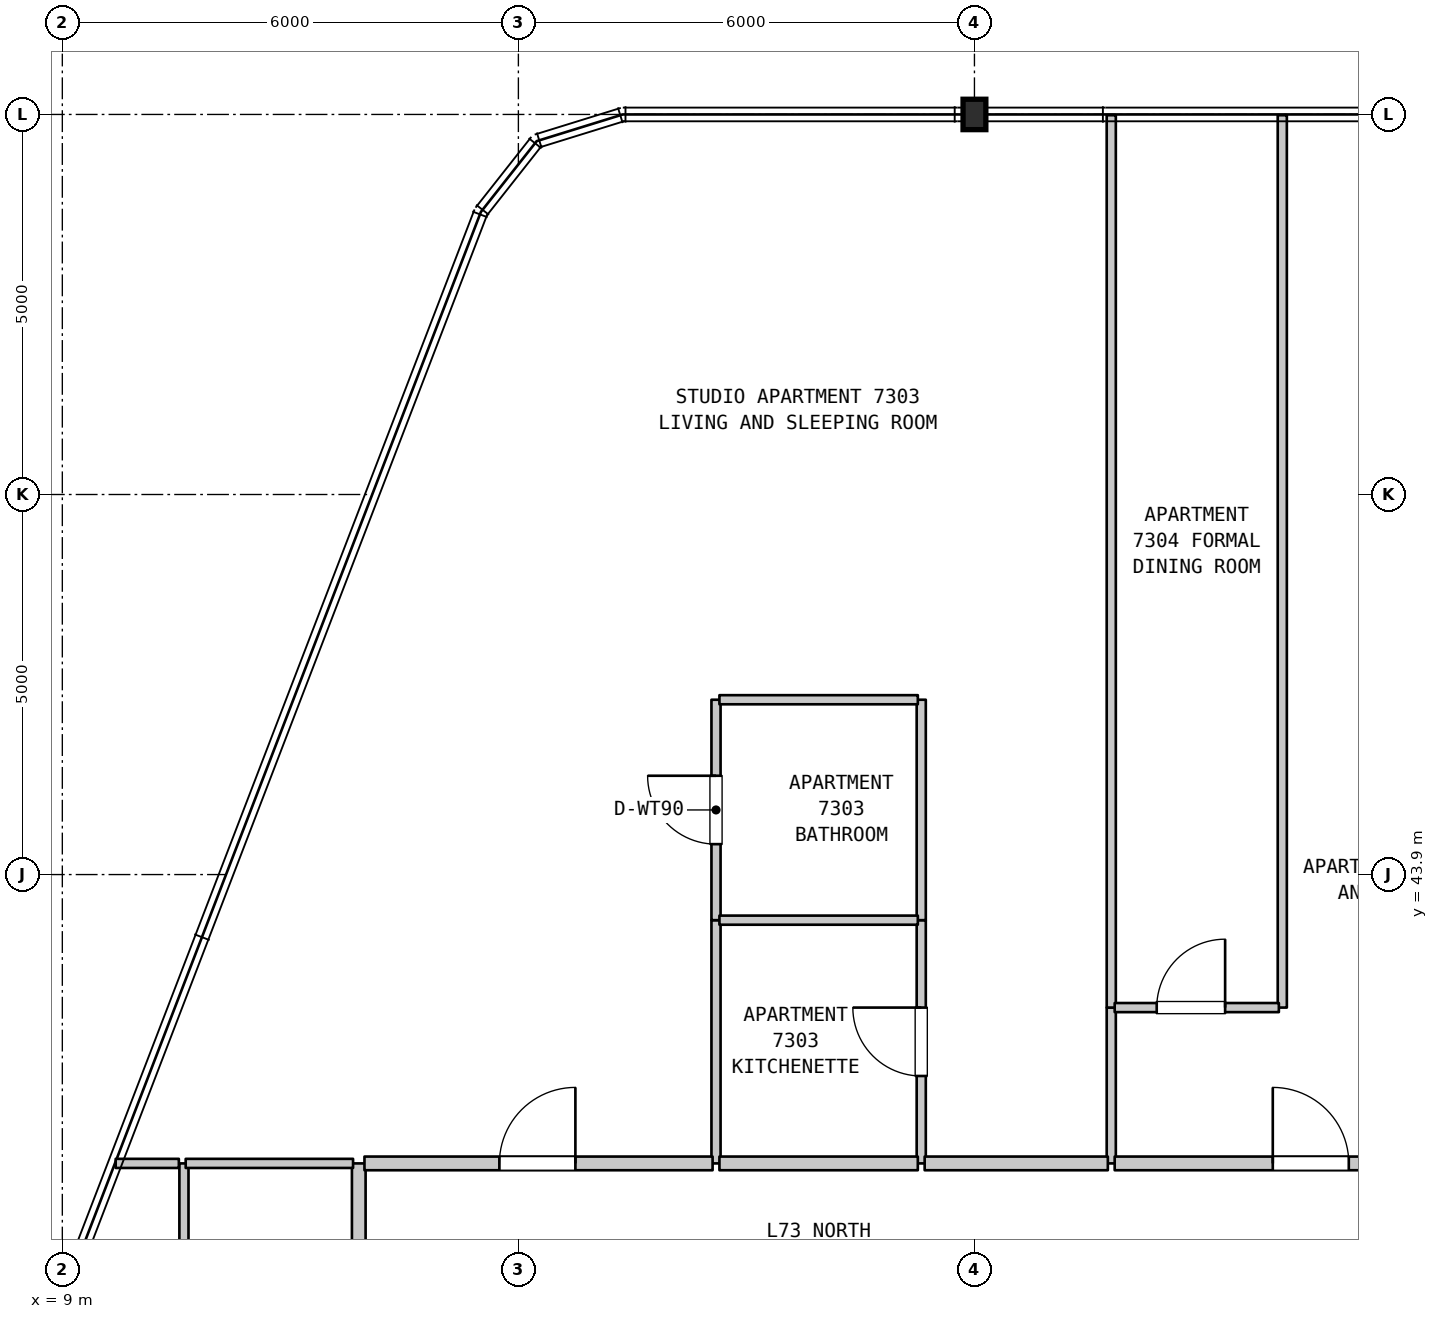
"""IFC4 building model, lengths in metres.
Left out: names, types, materials, properties, quantities, classifications, styles, units other than length and angle.
Written with IfcOpenShell. Run it as: python <this file> out.ifc"""

import sys

from ifc_helpers import new_model, si_unit, direction, frame, frame_2d, origin, origin_2d, place, context, subcontext, project, spatial, rectangle, i_section, extrude, element, fill, save


model = new_model("IFC4")
c1 = context("Model", 3, precision=1e-05, world=origin(), true_north=direction((0.0, 1.0)))
c2 = subcontext(c1, "Body", "Model", "MODEL_VIEW")
j1 = project(units=[si_unit("LENGTHUNIT", "METRE"), si_unit("PLANEANGLEUNIT", "RADIAN")], contexts=[c1])
p1 = place(None, origin())
s1 = spatial("IfcSite", under=j1, at=p1, CompositionType="ELEMENT")
p2 = place(p1, origin())
s2 = spatial("IfcBuilding", under=s1, at=p2, CompositionType="ELEMENT")
p3 = place(p2, frame((0.0, 0.0, 291.7)))
s3 = spatial("IfcBuildingStorey", under=s2, at=p3, CompositionType="ELEMENT", Elevation=291.7)
p4 = place(p3, frame((21.0, 53.9, 0.0), z_axis=(0.0, 0.0, 1.0), x_axis=(1.0, 0.0, 0.0)))
e1 = element("IfcColumn", 1, at=p4, inside=s3, PredefinedType="COLUMN", context=c2, shape_type="SweptSolid", body=[
    extrude(i_section(OverallWidth=0.3, OverallDepth=0.4, WebThickness=0.013, FlangeThickness=0.024, FilletRadius=0.027, at=origin_2d()), origin(), (0.0, 0.0, 1.0), 3.7),
])
p5 = place(p3, frame((10.6, 35.59, 0.0), z_axis=(0.0, 0.0, 1.0), x_axis=(0.0, 1.0, 0.0)))
e2 = element("IfcWall", 2, at=p5, inside=s3, PredefinedType="PARTITIONING", context=c2, shape_type="SweptSolid", body=[
    extrude(rectangle(XDim=4.51, YDim=0.12, at=frame_2d((2.255, 0.0))), origin(), (0.0, 0.0, 1.0), 3.39),
])
p6 = place(p3, frame((12.9, 35.59, 0.0), z_axis=(0.0, 0.0, 1.0), x_axis=(0.0, 1.0, 0.0)))
e3 = element("IfcWall", 3, at=p6, inside=s3, PredefinedType="STANDARD", context=c2, shape_type="SweptSolid", body=[
    extrude(rectangle(XDim=4.51, YDim=0.18, at=frame_2d((2.255, 0.0))), origin(), (0.0, 0.0, 1.0), 3.39),
])
p7 = place(p3, frame((17.6, 40.1, 0.0), z_axis=(0.0, 0.0, 1.0), x_axis=(0.0, 1.0, 0.0)))
e4 = element("IfcWall", 4, at=p7, inside=s3, PredefinedType="PARTITIONING", context=c2, shape_type="SweptSolid", body=[
    extrude(rectangle(XDim=3.2, YDim=0.12, at=frame_2d((1.6, 0.0))), origin(), (0.0, 0.0, 1.0), 3.39),
])
p8 = place(p3, frame((17.6, 43.3, 0.0), z_axis=(0.0, 0.0, 1.0), x_axis=(0.0, 1.0, 0.0)))
e5 = element("IfcWall", 5, at=p8, inside=s3, PredefinedType="PARTITIONING", context=c2, shape_type="SweptSolid", body=[
    extrude(rectangle(XDim=2.9, YDim=0.12, at=frame_2d((1.45, 0.0))), origin(), (0.0, 0.0, 1.0), 3.39),
])
p9 = place(p8, frame((1.0, 0.0, 0.0)))
e6 = element("IfcOpeningElement", 6, at=p9, cuts=e5, PredefinedType="OPENING", context=c2, shape_type="SweptSolid", body=[
    extrude(rectangle(XDim=0.9, YDim=2.1, at=frame_2d((0.45, 1.05))), frame((0.0, 0.07, 0.0), z_axis=(0.0, -1.0, 0.0), x_axis=(1.0, 0.0, 0.0)), (0.0, 0.0, 1.0), 0.14),
])
p10 = place(p3, frame((20.3, 40.1, 0.0), z_axis=(0.0, 0.0, 1.0), x_axis=(0.0, 1.0, 0.0)))
e7 = element("IfcWall", 7, at=p10, inside=s3, PredefinedType="PARTITIONING", context=c2, shape_type="SweptSolid", body=[
    extrude(rectangle(XDim=3.2, YDim=0.12, at=frame_2d((1.6, 0.0))), origin(), (0.0, 0.0, 1.0), 3.39),
])
p11 = place(p10, frame((1.15, 0.0, 0.0)))
e8 = element("IfcOpeningElement", 8, at=p11, cuts=e7, PredefinedType="OPENING", context=c2, shape_type="SweptSolid", body=[
    extrude(rectangle(XDim=0.9, YDim=2.15, at=frame_2d((0.45, 1.075))), frame((0.0, 0.07, 0.0), z_axis=(0.0, -1.0, 0.0), x_axis=(1.0, 0.0, 0.0)), (0.0, 0.0, 1.0), 0.14),
])
p12 = place(p3, frame((20.3, 43.3, 0.0), z_axis=(0.0, 0.0, 1.0), x_axis=(0.0, 1.0, 0.0)))
e9 = element("IfcWall", 9, at=p12, inside=s3, PredefinedType="PARTITIONING", context=c2, shape_type="SweptSolid", body=[
    extrude(rectangle(XDim=2.9, YDim=0.12, at=frame_2d((1.45, 0.0))), origin(), (0.0, 0.0, 1.0), 3.39),
])
p13 = place(p3, frame((22.8, 40.1, 0.0), z_axis=(0.0, 0.0, 1.0), x_axis=(0.0, 1.0, 0.0)))
e10 = element("IfcWall", 10, at=p13, inside=s3, PredefinedType="PARTITIONING", context=c2, shape_type="SweptSolid", body=[
    extrude(rectangle(XDim=2.05, YDim=0.12, at=frame_2d((1.025, 0.0))), origin(), (0.0, 0.0, 1.0), 3.39),
])
for number, where, z_axis, x_axis in (
    (11, (22.8, 42.15, 0.0), (0.0, 0.0, 1.0), (0.0, 1.0, 0.0)),
    (12, (25.05, 42.15, 0.0), (0.0, 0.0, 1.0), (0.0, 1.0, 0.0)),
):
    element("IfcWall", number, at=place(p3, frame(where, z_axis=z_axis, x_axis=x_axis)), inside=s3, PredefinedType="PARTITIONING", context=c2, shape_type="SweptSolid", body=[
        extrude(rectangle(XDim=11.74, YDim=0.12, at=frame_2d((5.87, 0.0))), origin(), (0.0, 0.0, 1.0), 3.39),
    ])
p14 = place(p3, frame((9.702, 40.1, 0.0), z_axis=(0.0, 0.0, 1.0), x_axis=(1.0, 0.0, 0.0)))
e13 = element("IfcWall", 13, at=p14, inside=s3, PredefinedType="PARTITIONING", context=c2, shape_type="SweptSolid", body=[
    extrude(rectangle(XDim=0.831, YDim=0.12, at=frame_2d((0.416, 0.0))), origin(), (0.0, 0.0, 1.0), 3.39),
])
p15 = place(p3, frame((10.623, 40.1, 0.0), z_axis=(0.0, 0.0, 1.0), x_axis=(1.0, 0.0, 0.0)))
e14 = element("IfcWall", 14, at=p15, inside=s3, PredefinedType="PARTITIONING", context=c2, shape_type="SweptSolid", body=[
    extrude(rectangle(XDim=2.202, YDim=0.12, at=frame_2d((1.101, 0.0))), origin(), (0.0, 0.0, 1.0), 3.39),
])
p16 = place(p3, frame((12.975, 40.1, 0.0), z_axis=(0.0, 0.0, 1.0), x_axis=(1.0, 0.0, 0.0)))
e15 = element("IfcWall", 15, at=p16, inside=s3, PredefinedType="STANDARD", context=c2, shape_type="SweptSolid", body=[
    extrude(rectangle(XDim=4.58, YDim=0.18, at=frame_2d((2.29, 0.0))), origin(), (0.0, 0.0, 1.0), 3.39),
])
p17 = place(p16, frame((1.775, 0.0, 0.0)))
e16 = element("IfcOpeningElement", 16, at=p17, cuts=e15, PredefinedType="OPENING", context=c2, shape_type="SweptSolid", body=[
    extrude(rectangle(XDim=1.0, YDim=2.15, at=frame_2d((0.5, 1.075))), frame((0.0, 0.1, 0.0), z_axis=(0.0, -1.0, 0.0), x_axis=(1.0, 0.0, 0.0)), (0.0, 0.0, 1.0), 0.2),
])
p18 = place(p3, frame((17.645, 40.1, 0.0), z_axis=(0.0, 0.0, 1.0), x_axis=(1.0, 0.0, 0.0)))
e17 = element("IfcWall", 17, at=p18, inside=s3, PredefinedType="STANDARD", context=c2, shape_type="SweptSolid", body=[
    extrude(rectangle(XDim=2.61, YDim=0.18, at=frame_2d((1.305, 0.0))), origin(), (0.0, 0.0, 1.0), 3.39),
])
p19 = place(p3, frame((20.345, 40.1, 0.0), z_axis=(0.0, 0.0, 1.0), x_axis=(1.0, 0.0, 0.0)))
e18 = element("IfcWall", 18, at=p19, inside=s3, PredefinedType="STANDARD", context=c2, shape_type="SweptSolid", body=[
    extrude(rectangle(XDim=2.41, YDim=0.18, at=frame_2d((1.205, 0.0))), origin(), (0.0, 0.0, 1.0), 3.39),
])
p20 = place(p3, frame((22.845, 40.1, 0.0), z_axis=(0.0, 0.0, 1.0), x_axis=(1.0, 0.0, 0.0)))
e19 = element("IfcWall", 19, at=p20, inside=s3, PredefinedType="STANDARD", context=c2, shape_type="SweptSolid", body=[
    extrude(rectangle(XDim=5.095, YDim=0.18, at=frame_2d((2.547, 0.0))), origin(), (0.0, 0.0, 1.0), 3.39),
])
p21 = place(p20, frame((2.08, 0.0, 0.0)))
e20 = element("IfcOpeningElement", 20, at=p21, cuts=e19, PredefinedType="OPENING", context=c2, shape_type="SweptSolid", body=[
    extrude(rectangle(XDim=1.0, YDim=2.15, at=frame_2d((0.5, 1.075))), frame((0.0, 0.1, 0.0), z_axis=(0.0, -1.0, 0.0), x_axis=(1.0, 0.0, 0.0)), (0.0, 0.0, 1.0), 0.2),
])
p22 = place(p3, frame((22.845, 42.15, 0.0), z_axis=(0.0, 0.0, 1.0), x_axis=(1.0, 0.0, 0.0)))
e21 = element("IfcWall", 21, at=p22, inside=s3, PredefinedType="PARTITIONING", context=c2, shape_type="SweptSolid", body=[
    extrude(rectangle(XDim=2.16, YDim=0.12, at=frame_2d((1.08, 0.0))), origin(), (0.0, 0.0, 1.0), 3.39),
])
p23 = place(p22, frame((0.553, 0.0, 0.0)))
e22 = element("IfcOpeningElement", 22, at=p23, cuts=e21, PredefinedType="OPENING", context=c2, shape_type="SweptSolid", body=[
    extrude(rectangle(XDim=0.9, YDim=2.15, at=frame_2d((0.45, 1.075))), frame((0.0, 0.07, 0.0), z_axis=(0.0, -1.0, 0.0), x_axis=(1.0, 0.0, 0.0)), (0.0, 0.0, 1.0), 0.14),
])
for number, where, z_axis, x_axis in (
    (23, (17.645, 43.3, 0.0), (0.0, 0.0, 1.0), (1.0, 0.0, 0.0)),
    (24, (17.645, 46.2, 0.0), (0.0, 0.0, 1.0), (1.0, 0.0, 0.0)),
):
    element("IfcWall", number, at=place(p3, frame(where, z_axis=z_axis, x_axis=x_axis)), inside=s3, PredefinedType="PARTITIONING", context=c2, shape_type="SweptSolid", body=[
        extrude(rectangle(XDim=2.61, YDim=0.12, at=frame_2d((1.305, 0.0))), origin(), (0.0, 0.0, 1.0), 3.39),
    ])
p24 = place(p9, origin())
e25 = element("IfcDoor", 25, at=p24, inside=s3, OperationType="SINGLE_SWING_RIGHT", PredefinedType="DOOR", context=c2, shape_type="SweptSolid", body=[
    extrude(rectangle(XDim=0.9, YDim=2.1, at=frame_2d((0.45, 1.05))), frame((0.0, 0.025, 0.0), z_axis=(0.0, -1.0, 0.0), x_axis=(1.0, 0.0, 0.0)), (0.0, 0.0, 1.0), 0.05),
])
fill(e6, e25)
p25 = place(p11, origin())
e26 = element("IfcDoor", 26, at=p25, inside=s3, OperationType="SINGLE_SWING_RIGHT", PredefinedType="DOOR", context=c2, shape_type="SweptSolid", body=[
    extrude(rectangle(XDim=0.9, YDim=2.15, at=frame_2d((0.45, 1.075))), frame((0.0, 0.025, 0.0), z_axis=(0.0, -1.0, 0.0), x_axis=(1.0, 0.0, 0.0)), (0.0, 0.0, 1.0), 0.05),
])
fill(e8, e26)
p26 = place(p17, origin())
e27 = element("IfcDoor", 27, at=p26, inside=s3, OperationType="SINGLE_SWING_RIGHT", PredefinedType="DOOR", context=c2, shape_type="SweptSolid", body=[
    extrude(rectangle(XDim=1.0, YDim=2.15, at=frame_2d((0.5, 1.075))), frame((0.0, 0.025, 0.0), z_axis=(0.0, -1.0, 0.0), x_axis=(1.0, 0.0, 0.0)), (0.0, 0.0, 1.0), 0.05),
])
fill(e16, e27)
p27 = place(p21, origin())
e28 = element("IfcDoor", 28, at=p27, inside=s3, OperationType="SINGLE_SWING_LEFT", PredefinedType="DOOR", context=c2, shape_type="SweptSolid", body=[
    extrude(rectangle(XDim=1.0, YDim=2.15, at=frame_2d((0.5, 1.075))), frame((0.0, 0.025, 0.0), z_axis=(0.0, -1.0, 0.0), x_axis=(1.0, 0.0, 0.0)), (0.0, 0.0, 1.0), 0.05),
])
fill(e20, e28)
p28 = place(p23, origin())
e29 = element("IfcDoor", 29, at=p28, inside=s3, OperationType="SINGLE_SWING_RIGHT", PredefinedType="DOOR", context=c2, shape_type="SweptSolid", body=[
    extrude(rectangle(XDim=0.9, YDim=2.15, at=frame_2d((0.45, 1.075))), frame((0.0, 0.025, 0.0), z_axis=(0.0, -1.0, 0.0), x_axis=(1.0, 0.0, 0.0)), (0.0, 0.0, 1.0), 0.05),
])
fill(e22, e29)
save(model, sys.argv[1])
